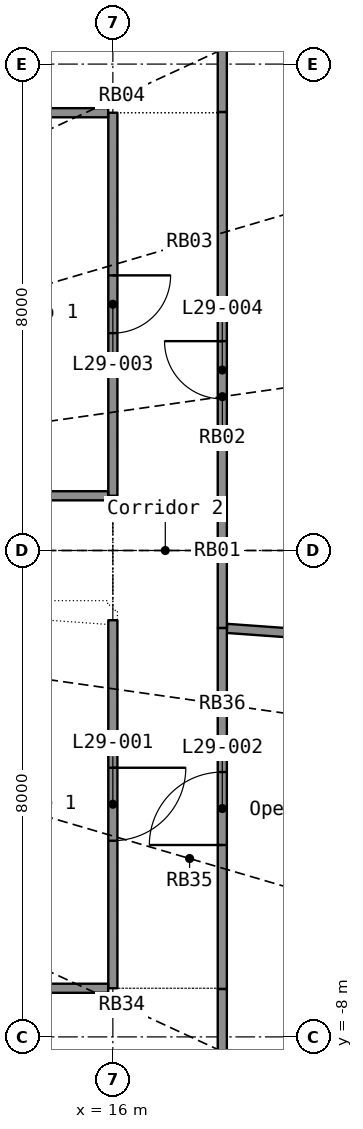
"""IFC4 building model, lengths in metres.
Left out: names, types, materials, properties, quantities, classifications, styles, units other than length and angle.
Written with IfcOpenShell. Run it as: python <this file> out.ifc"""

import sys

from ifc_helpers import new_model, si_unit, direction, frame, frame_2d, origin, place, context, subcontext, project, spatial, rectangle, extrude, element, fill, save


model = new_model("IFC4")
c1 = context("Model", 3, precision=1e-05, world=origin(), true_north=direction((0.0, 1.0)))
c2 = subcontext(c1, "Body", "Model", "MODEL_VIEW")
j1 = project(units=[si_unit("LENGTHUNIT", "METRE"), si_unit("PLANEANGLEUNIT", "RADIAN")], contexts=[c1])
p1 = place(None, origin())
s1 = spatial("IfcSite", under=j1, at=p1, CompositionType="ELEMENT")
p2 = place(p1, origin())
s2 = spatial("IfcBuilding", under=s1, at=p2, CompositionType="ELEMENT")
p3 = place(p2, frame((0.0, 0.0, 123.0)))
s3 = spatial("IfcBuildingStorey", under=s2, at=p3, CompositionType="ELEMENT", Elevation=123.0)
p4 = place(p3, frame((17.8, -1.276, 0.0), z_axis=(0.0, 0.0, 1.0), x_axis=(0.0, 1.0, 0.0)))
e1 = element("IfcWall", 1, at=p4, inside=s3, PredefinedType="PARTITIONING", context=c2, shape_type="SweptSolid", body=[
    extrude(rectangle(XDim=8.488, YDim=0.15, at=frame_2d((4.244, 0.0))), origin(), (0.0, 0.0, 1.0), 2.4),
])
p5 = place(p4, frame((3.769, 0.0, 0.0)))
e2 = element("IfcOpeningElement", 2, at=p5, cuts=e1, PredefinedType="OPENING", context=c2, shape_type="SweptSolid", body=[
    extrude(rectangle(XDim=0.95, YDim=2.15, at=frame_2d((0.475, 1.075))), frame((0.0, 0.085, 0.0), z_axis=(0.0, -1.0, 0.0), x_axis=(1.0, 0.0, 0.0)), (0.0, 0.0, 1.0), 0.17),
])
p6 = place(p3, frame((25.006, -1.792, 0.0), z_axis=(0.0, 0.0, 1.0), x_axis=(-0.997440983, 0.071494657, 0.0)))
e3 = element("IfcWall", 3, at=p6, inside=s3, PredefinedType="PARTITIONING", context=c2, shape_type="SweptSolid", body=[
    extrude(rectangle(XDim=7.147, YDim=0.15, at=frame_2d((3.574, 0.0))), origin(), (0.0, 0.0, 1.0), 2.4),
])
p7 = place(p3, frame((16.0, 7.2, 0.0), z_axis=(0.0, 0.0, 1.0), x_axis=(0.0, -1.0, 0.0)))
e4 = element("IfcWall", 4, at=p7, inside=s3, PredefinedType="PARTITIONING", context=c2, shape_type="SweptSolid", body=[
    extrude(rectangle(XDim=6.3, YDim=0.15, at=frame_2d((3.15, 0.0))), origin(), (0.0, 0.0, 1.0), 2.4),
])
p8 = place(p7, frame((2.675, 0.0, 0.0)))
e5 = element("IfcOpeningElement", 5, at=p8, cuts=e4, PredefinedType="OPENING", context=c2, shape_type="SweptSolid", body=[
    extrude(rectangle(XDim=0.95, YDim=2.15, at=frame_2d((0.475, 1.075))), frame((0.0, 0.085, 0.0), z_axis=(0.0, -1.0, 0.0), x_axis=(1.0, 0.0, 0.0)), (0.0, 0.0, 1.0), 0.17),
])
p9 = place(p3, frame((16.0, -1.146, 0.0), z_axis=(0.0, 0.0, 1.0), x_axis=(0.0, -1.0, 0.0)))
e6 = element("IfcWall", 6, at=p9, inside=s3, PredefinedType="PARTITIONING", context=c2, shape_type="SweptSolid", body=[
    extrude(rectangle(XDim=6.053, YDim=0.15, at=frame_2d((3.027, 0.0))), origin(), (0.0, 0.0, 1.0), 2.4),
])
p10 = place(p9, frame((2.427, 0.0, 0.0)))
e7 = element("IfcOpeningElement", 7, at=p10, cuts=e6, PredefinedType="OPENING", context=c2, shape_type="SweptSolid", body=[
    extrude(rectangle(XDim=1.2, YDim=2.2, at=frame_2d((0.6, 1.1))), frame((0.0, 0.085, 0.0), z_axis=(0.0, -1.0, 0.0), x_axis=(1.0, 0.0, 0.0)), (0.0, 0.0, 1.0), 0.17),
])
p11 = place(p3, frame((17.8, -7.212, 0.0), z_axis=(0.0, 0.0, 1.0), x_axis=(0.0, 1.0, 0.0)))
e8 = element("IfcWall", 8, at=p11, inside=s3, PredefinedType="PARTITIONING", context=c2, shape_type="SweptSolid", body=[
    extrude(rectangle(XDim=5.936, YDim=0.15, at=frame_2d((2.968, 0.0))), origin(), (0.0, 0.0, 1.0), 2.4),
])
p12 = place(p11, frame((2.368, 0.0, 0.0)))
e9 = element("IfcOpeningElement", 9, at=p12, cuts=e8, PredefinedType="OPENING", context=c2, shape_type="SweptSolid", body=[
    extrude(rectangle(XDim=1.2, YDim=2.2, at=frame_2d((0.6, 1.1))), frame((0.0, 0.085, 0.0), z_axis=(0.0, -1.0, 0.0), x_axis=(1.0, 0.0, 0.0)), (0.0, 0.0, 1.0), 0.17),
])
for number, where, z_axis, x_axis in (
    (10, (15.923, -7.2, 0.0), (0.0, 0.0, 1.0), (-1.0, 0.0, 0.0)),
    (11, (15.923, 0.9, 0.0), (0.0, 0.0, 1.0), (-1.0, 0.0, 0.0)),
):
    element("IfcWall", number, at=place(p3, frame(where, z_axis=z_axis, x_axis=x_axis)), inside=s3, PredefinedType="PARTITIONING", context=c2, shape_type="SweptSolid", body=[
        extrude(rectangle(XDim=3.923, YDim=0.15, at=frame_2d((1.961, 0.0))), origin(), (0.0, 0.0, 1.0), 2.4),
    ])
p13 = place(p3, frame((17.8, -10.723, 0.0), z_axis=(0.0, 0.0, 1.0), x_axis=(0.0, 1.0, 0.0)))
e12 = element("IfcWall", 12, at=p13, inside=s3, PredefinedType="PARTITIONING", context=c2, shape_type="SweptSolid", body=[
    extrude(rectangle(XDim=3.51, YDim=0.15, at=frame_2d((1.755, 0.0))), origin(), (0.0, 0.0, 1.0), 2.4),
])
p14 = place(p3, frame((12.553, 7.2, 0.0), z_axis=(0.0, 0.0, 1.0), x_axis=(1.0, 0.0, 0.0)))
e13 = element("IfcWall", 13, at=p14, inside=s3, PredefinedType="PARTITIONING", context=c2, shape_type="SweptSolid", body=[
    extrude(rectangle(XDim=3.37, YDim=0.15, at=frame_2d((1.685, 0.0))), origin(), (0.0, 0.0, 1.0), 2.4),
])
p15 = place(p3, frame((17.8, 7.213, 0.0), z_axis=(0.0, 0.0, 1.0), x_axis=(0.0, 1.0, 0.0)))
e14 = element("IfcWall", 14, at=p15, inside=s3, PredefinedType="PARTITIONING", context=c2, shape_type="SweptSolid", body=[
    extrude(rectangle(XDim=2.387, YDim=0.15, at=frame_2d((1.194, 0.0))), origin(), (0.0, 0.0, 1.0), 2.4),
])
p16 = place(p10, origin())
e15 = element("IfcDoor", 15, at=p16, inside=s3, OperationType="DOUBLE_DOOR_SINGLE_SWING", PredefinedType="DOOR", context=c2, shape_type="SweptSolid", body=[
    extrude(rectangle(XDim=1.2, YDim=2.2, at=frame_2d((0.6, 1.1))), frame((0.0, 0.025, 0.0), z_axis=(0.0, -1.0, 0.0), x_axis=(1.0, 0.0, 0.0)), (0.0, 0.0, 1.0), 0.05),
])
fill(e7, e15)
p17 = place(p12, origin())
e16 = element("IfcDoor", 16, at=p17, inside=s3, OperationType="DOUBLE_DOOR_SINGLE_SWING", PredefinedType="DOOR", context=c2, shape_type="SweptSolid", body=[
    extrude(rectangle(XDim=1.2, YDim=2.2, at=frame_2d((0.6, 1.1))), frame((0.0, 0.025, 0.0), z_axis=(0.0, -1.0, 0.0), x_axis=(1.0, 0.0, 0.0)), (0.0, 0.0, 1.0), 0.05),
])
fill(e9, e16)
p18 = place(p8, origin())
e17 = element("IfcDoor", 17, at=p18, inside=s3, OperationType="SINGLE_SWING_LEFT", PredefinedType="DOOR", context=c2, shape_type="SweptSolid", body=[
    extrude(rectangle(XDim=0.95, YDim=2.15, at=frame_2d((0.475, 1.075))), frame((0.0, 0.025, 0.0), z_axis=(0.0, -1.0, 0.0), x_axis=(1.0, 0.0, 0.0)), (0.0, 0.0, 1.0), 0.05),
])
fill(e5, e17)
p19 = place(p5, origin())
e18 = element("IfcDoor", 18, at=p19, inside=s3, OperationType="SINGLE_SWING_RIGHT", PredefinedType="DOOR", context=c2, shape_type="SweptSolid", body=[
    extrude(rectangle(XDim=0.95, YDim=2.15, at=frame_2d((0.475, 1.075))), frame((0.0, 0.025, 0.0), z_axis=(0.0, -1.0, 0.0), x_axis=(1.0, 0.0, 0.0)), (0.0, 0.0, 1.0), 0.05),
])
fill(e2, e18)
save(model, sys.argv[1])
